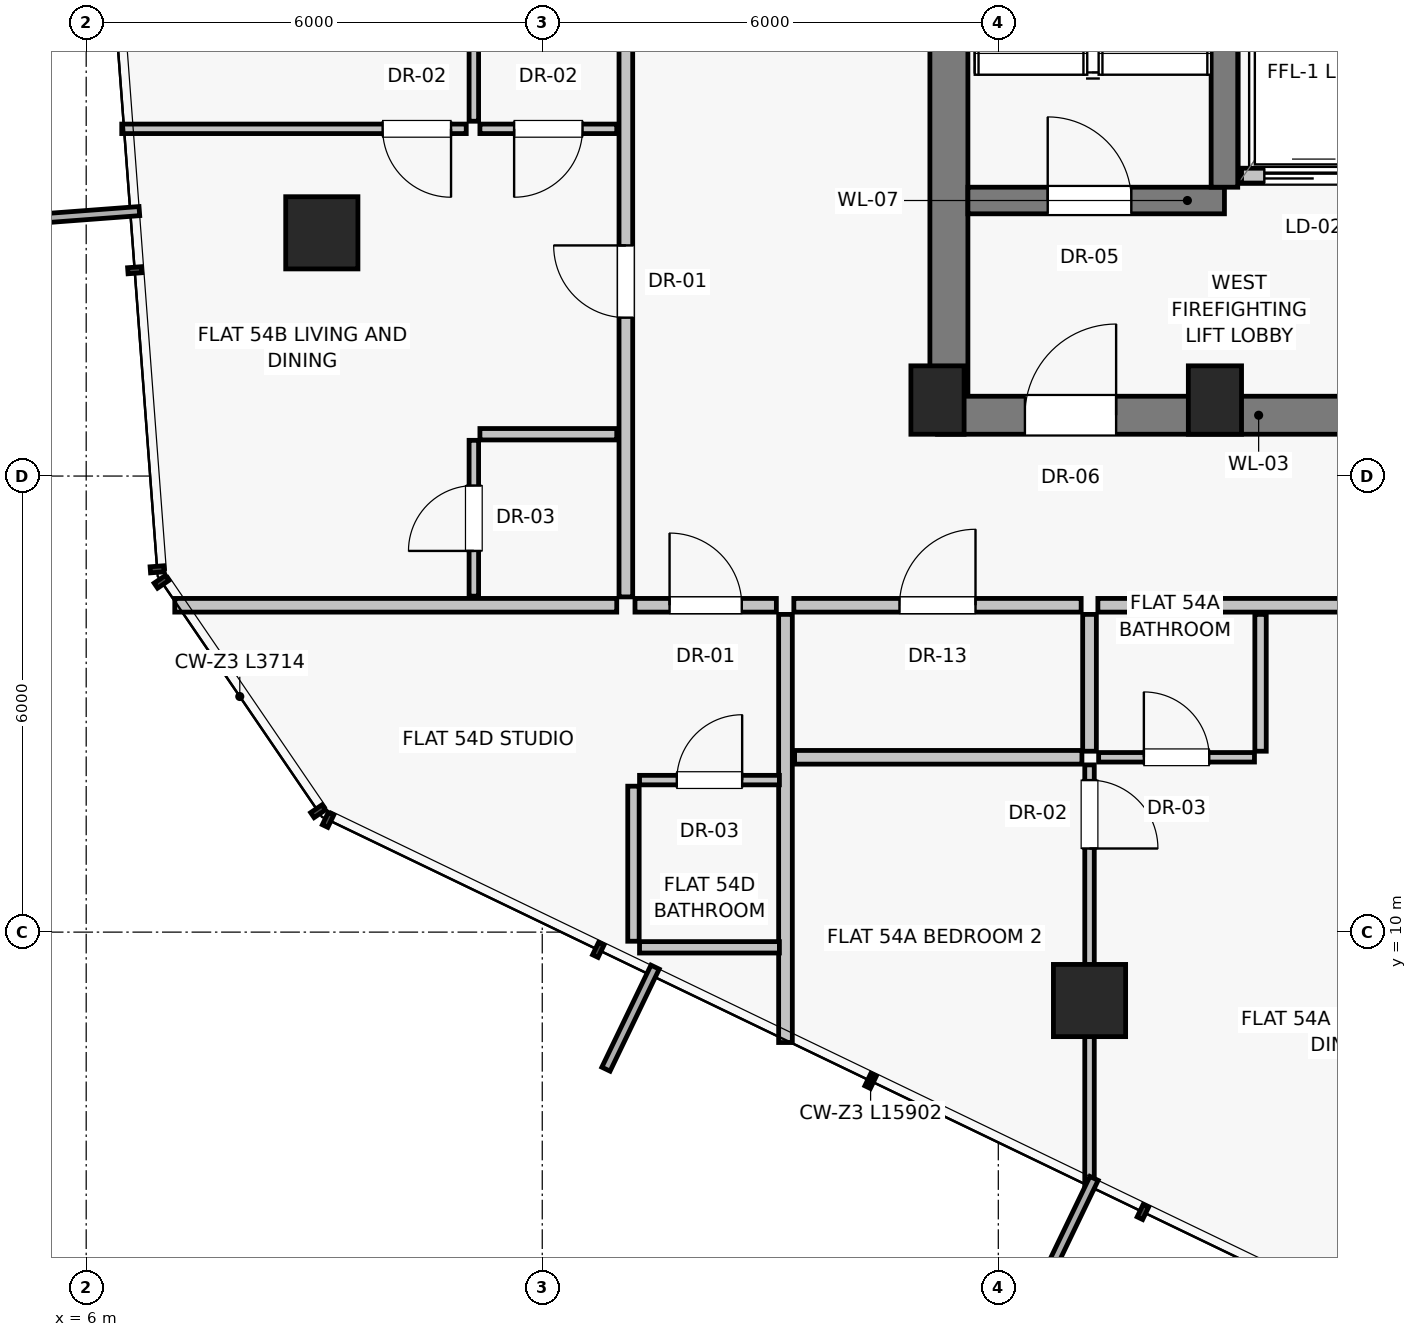
"""IFC4 building model, lengths in metres.
Left out: names, types, materials, properties, quantities, classifications, styles, units other than length and angle.
Written with IfcOpenShell. Run it as: python <this file> out.ifc"""

import sys

from ifc_helpers import new_model, si_unit, direction, frame, frame_2d, origin, origin_2d, place, context, subcontext, project, spatial, rectangle, extrude, source, transform, mapped, element, fill, save


model = new_model("IFC4")
c1 = context("Model", 3, precision=1e-05, world=origin(), true_north=direction((0.0, 1.0)))
c2 = subcontext(c1, "Body", "Model", "MODEL_VIEW")
j1 = project(units=[si_unit("LENGTHUNIT", "METRE"), si_unit("PLANEANGLEUNIT", "RADIAN")], contexts=[c1])
p1 = place(None, origin())
s1 = spatial("IfcSite", under=j1, at=p1, CompositionType="ELEMENT")
p2 = place(p1, origin())
s2 = spatial("IfcBuilding", under=s1, at=p2, CompositionType="ELEMENT")
p3 = place(p2, frame((0.0, 0.0, 191.85)))
s3 = spatial("IfcBuildingStorey", under=s2, at=p3, CompositionType="ELEMENT", Elevation=191.85)
for number, where, z_axis, x_axis in (
    (1, (17.2, 17.0, 0.0), (0.0, 0.0, 1.0), (1.0, 0.0, 0.0)),
    (2, (20.85, 17.0, 0.0), (0.0, 0.0, 1.0), (1.0, 0.0, 0.0)),
):
    element("IfcColumn", number, at=place(p3, frame(where, z_axis=z_axis, x_axis=x_axis)), inside=s3, PredefinedType="PILASTER", context=c2, shape_type="SweptSolid", body=[
        extrude(rectangle(XDim=0.7, YDim=0.9, at=origin_2d()), origin(), (0.0, 0.0, 1.0), 3.25),
    ])
for number, where, z_axis, x_axis in (
    (3, (9.1, 19.2, 0.0), (0.0, 0.0, 1.0), (1.0, 0.0, 0.0)),
    (4, (19.2, 9.1, 0.0), (0.0, 0.0, 1.0), (1.0, 0.0, 0.0)),
):
    element("IfcColumn", number, at=place(p3, frame(where, z_axis=z_axis, x_axis=x_axis)), inside=s3, PredefinedType="COLUMN", context=c2, shape_type="SweptSolid", body=[
        extrude(rectangle(XDim=0.95, YDim=0.95, at=origin_2d()), origin(), (0.0, 0.0, 1.0), 3.25),
    ])
p4 = place(p3, frame((17.35, 16.8, 0.0), z_axis=(0.0, 0.0, 1.0), x_axis=(0.0, 1.0, 0.0)))
e5 = element("IfcWall", 5, at=p4, inside=s3, PredefinedType="SHEAR", context=c2, shape_type="SweptSolid", body=[
    extrude(rectangle(XDim=14.2, YDim=0.5, at=frame_2d((7.1, 0.0))), origin(), (0.0, 0.0, 1.0), 3.015),
])
p5 = place(p3, frame((17.2, 16.8, 0.0), z_axis=(0.0, 0.0, 1.0), x_axis=(1.0, 0.0, 0.0)))
e6 = element("IfcWall", 6, at=p5, inside=s3, PredefinedType="SHEAR", context=c2, shape_type="SweptSolid", body=[
    extrude(rectangle(XDim=5.85, YDim=0.5, at=frame_2d((2.925, 0.0))), origin(), (0.0, 0.0, 1.0), 3.015),
])
p6 = place(p5, frame((1.15, 0.0, 0.0)))
e7 = element("IfcOpeningElement", 7, at=p6, cuts=e6, PredefinedType="OPENING", context=c2, shape_type="SweptSolid", body=[
    extrude(rectangle(XDim=1.2, YDim=2.03, at=frame_2d((0.6, 1.015))), frame((0.0, 0.26, 0.0), z_axis=(0.0, -1.0, 0.0), x_axis=(1.0, 0.0, 0.0)), (0.0, 0.0, 1.0), 0.52),
])
p7 = place(p3, frame((17.6, 19.625, 0.0), z_axis=(0.0, 0.0, 1.0), x_axis=(1.0, 0.0, 0.0)))
e8 = element("IfcWall", 8, at=p7, inside=s3, PredefinedType="SHEAR", context=c2, shape_type="SweptSolid", body=[
    extrude(rectangle(XDim=3.375, YDim=0.35, at=frame_2d((1.688, 0.0))), origin(), (0.0, 0.0, 1.0), 3.015),
])
p8 = place(p7, frame((1.05, 0.0, 0.0)))
e9 = element("IfcOpeningElement", 9, at=p8, cuts=e8, PredefinedType="OPENING", context=c2, shape_type="SweptSolid", body=[
    extrude(rectangle(XDim=1.1, YDim=2.03, at=frame_2d((0.55, 1.015))), frame((0.0, 0.185, 0.0), z_axis=(0.0, -1.0, 0.0), x_axis=(1.0, 0.0, 0.0)), (0.0, 0.0, 1.0), 0.37),
])
p9 = place(p3, frame((21.2, 19.95, 0.0), z_axis=(0.0, 0.0, 1.0), x_axis=(1.0, 0.0, 0.0)))
e10 = element("IfcWall", 10, at=p9, inside=s3, PredefinedType="SOLIDWALL", context=c2, shape_type="SweptSolid", body=[
    extrude(rectangle(XDim=1.85, YDim=0.2, at=frame_2d((0.925, 0.0))), origin(), (0.0, 0.0, 1.0), 3.015),
])
p10 = place(p9, frame((0.3, 0.0, 0.0)))
e11 = element("IfcOpeningElement", 11, at=p10, cuts=e10, PredefinedType="OPENING", context=c2, shape_type="SweptSolid", body=[
    extrude(rectangle(XDim=1.3, YDim=2.25, at=frame_2d((0.65, 1.125))), frame((0.0, 0.11, 0.0), z_axis=(0.0, -1.0, 0.0), x_axis=(1.0, 0.0, 0.0)), (0.0, 0.0, 1.0), 0.22),
])
p11 = place(p3, frame((20.975, 19.8, 0.0), z_axis=(0.0, 0.0, 1.0), x_axis=(0.0, 1.0, 0.0)))
e12 = element("IfcWall", 12, at=p11, inside=s3, PredefinedType="SHEAR", context=c2, shape_type="SweptSolid", body=[
    extrude(rectangle(XDim=8.775, YDim=0.35, at=frame_2d((4.387, 0.0))), origin(), (0.0, 0.0, 1.0), 3.015),
])
p12 = place(p3, frame((15.2, 14.18, 0.0), z_axis=(0.0, 0.0, 1.0), x_axis=(0.0, -1.0, 0.0)))
e13 = element("IfcWall", 13, at=p12, inside=s3, PredefinedType="PARTITIONING", context=c2, shape_type="SweptSolid", body=[
    extrude(rectangle(XDim=5.633, YDim=0.18, at=frame_2d((2.816, 0.0))), origin(), (0.0, 0.0, 1.0), 3.015),
])
p13 = place(p3, frame((15.31, 14.3, 0.0), z_axis=(0.0, 0.0, 1.0), x_axis=(1.0, 0.0, 0.0)))
e14 = element("IfcWall", 14, at=p13, inside=s3, PredefinedType="PARTITIONING", context=c2, shape_type="SweptSolid", body=[
    extrude(rectangle(XDim=3.78, YDim=0.18, at=frame_2d((1.89, 0.0))), origin(), (0.0, 0.0, 1.0), 3.015),
])
p14 = place(p13, frame((1.39, 0.0, 0.0)))
e15 = element("IfcOpeningElement", 15, at=p14, cuts=e14, PredefinedType="OPENING", context=c2, shape_type="SweptSolid", body=[
    extrude(rectangle(XDim=1.0, YDim=2.01, at=frame_2d((0.5, 1.005))), frame((0.0, 0.1, 0.0), z_axis=(0.0, -1.0, 0.0), x_axis=(1.0, 0.0, 0.0)), (0.0, 0.0, 1.0), 0.2),
])
p15 = place(p3, frame((19.31, 14.3, 0.0), z_axis=(0.0, 0.0, 1.0), x_axis=(1.0, 0.0, 0.0)))
e16 = element("IfcWall", 16, at=p15, inside=s3, PredefinedType="PARTITIONING", context=c2, shape_type="SweptSolid", body=[
    extrude(rectangle(XDim=11.78, YDim=0.18, at=frame_2d((5.89, 0.0))), origin(), (0.0, 0.0, 1.0), 3.015),
])
p16 = place(p15, frame((3.98, 0.0, 0.0)))
e17 = element("IfcOpeningElement", 17, at=p16, cuts=e16, PredefinedType="OPENING", context=c2, shape_type="SweptSolid", body=[
    extrude(rectangle(XDim=0.95, YDim=2.02, at=frame_2d((0.475, 1.01))), frame((0.0, 0.1, 0.0), z_axis=(0.0, -1.0, 0.0), x_axis=(1.0, 0.0, 0.0)), (0.0, 0.0, 1.0), 0.2),
])
p17 = place(p3, frame((15.32, 12.3, 0.0), z_axis=(0.0, 0.0, 1.0), x_axis=(1.0, 0.0, 0.0)))
e18 = element("IfcWall", 18, at=p17, inside=s3, PredefinedType="PARTITIONING", context=c2, shape_type="SweptSolid", body=[
    extrude(rectangle(XDim=3.78, YDim=0.18, at=frame_2d((1.89, 0.0))), origin(), (0.0, 0.0, 1.0), 3.015),
])
p18 = place(p3, frame((19.2, 14.18, 0.0), z_axis=(0.0, 0.0, 1.0), x_axis=(0.0, -1.0, 0.0)))
e19 = element("IfcWall", 19, at=p18, inside=s3, PredefinedType="PARTITIONING", context=c2, shape_type="SweptSolid", body=[
    extrude(rectangle(XDim=1.8, YDim=0.18, at=frame_2d((0.9, 0.0))), origin(), (0.0, 0.0, 1.0), 3.015),
])
p19 = place(p3, frame((19.2, 12.2, 0.0), z_axis=(0.0, 0.0, 1.0), x_axis=(0.0, -1.0, 0.0)))
e20 = element("IfcWall", 20, at=p19, inside=s3, PredefinedType="PARTITIONING", context=c2, shape_type="SweptSolid", body=[
    extrude(rectangle(XDim=5.578, YDim=0.125, at=frame_2d((2.789, 0.0))), origin(), (0.0, 0.0, 1.0), 2.469),
])
p20 = place(p19, frame((0.2, 0.0, 0.0)))
e21 = element("IfcOpeningElement", 21, at=p20, cuts=e20, PredefinedType="OPENING", context=c2, shape_type="SweptSolid", body=[
    extrude(rectangle(XDim=0.9, YDim=2.01, at=frame_2d((0.45, 1.005))), frame((0.0, 0.073, 0.0), z_axis=(0.0, -1.0, 0.0), x_axis=(1.0, 0.0, 0.0)), (0.0, 0.0, 1.0), 0.145),
])
p21 = place(p3, frame((21.45, 14.18, 0.0), z_axis=(0.0, 0.0, 1.0), x_axis=(0.0, -1.0, 0.0)))
e22 = element("IfcWall", 22, at=p21, inside=s3, PredefinedType="PARTITIONING", context=c2, shape_type="SweptSolid", body=[
    extrude(rectangle(XDim=1.8, YDim=0.15, at=frame_2d((0.9, 0.0))), origin(), (0.0, 0.0, 1.0), 3.015),
])
p22 = place(p3, frame((19.32, 12.3, 0.0), z_axis=(0.0, 0.0, 1.0), x_axis=(1.0, 0.0, 0.0)))
e23 = element("IfcWall", 23, at=p22, inside=s3, PredefinedType="PARTITIONING", context=c2, shape_type="SweptSolid", body=[
    extrude(rectangle(XDim=2.05, YDim=0.125, at=frame_2d((1.025, 0.0))), origin(), (0.0, 0.0, 1.0), 3.015),
])
p23 = place(p22, frame((0.595, 0.0, 0.0)))
e24 = element("IfcOpeningElement", 24, at=p23, cuts=e23, PredefinedType="OPENING", context=c2, shape_type="SweptSolid", body=[
    extrude(rectangle(XDim=0.86, YDim=2.01, at=frame_2d((0.43, 1.005))), frame((0.0, 0.073, 0.0), z_axis=(0.0, -1.0, 0.0), x_axis=(1.0, 0.0, 0.0)), (0.0, 0.0, 1.0), 0.145),
])
p24 = place(p3, frame((12.98, 14.3, 0.0), z_axis=(0.0, 0.0, 1.0), x_axis=(-1.0, 0.0, 0.0)))
e25 = element("IfcWall", 25, at=p24, inside=s3, PredefinedType="PARTITIONING", context=c2, shape_type="SweptSolid", body=[
    extrude(rectangle(XDim=5.814, YDim=0.18, at=frame_2d((2.907, 0.0))), origin(), (0.0, 0.0, 1.0), 3.015),
])
p25 = place(p3, frame((13.1, 14.41, 0.0), z_axis=(0.0, 0.0, 1.0), x_axis=(0.0, 1.0, 0.0)))
e26 = element("IfcWall", 26, at=p25, inside=s3, PredefinedType="PARTITIONING", context=c2, shape_type="SweptSolid", body=[
    extrude(rectangle(XDim=11.176, YDim=0.18, at=frame_2d((5.588, 0.0))), origin(), (0.0, 0.0, 1.0), 2.662),
])
p26 = place(p25, frame((3.674, 0.0, 0.0)))
e27 = element("IfcOpeningElement", 27, at=p26, cuts=e26, PredefinedType="OPENING", context=c2, shape_type="SweptSolid", body=[
    extrude(rectangle(XDim=0.95, YDim=2.02, at=frame_2d((0.475, 1.01))), frame((0.0, 0.1, 0.0), z_axis=(0.0, -1.0, 0.0), x_axis=(1.0, 0.0, 0.0)), (0.0, 0.0, 1.0), 0.2),
])
p27 = place(p3, frame((12.98, 16.55, 0.0), z_axis=(0.0, 0.0, 1.0), x_axis=(-1.0, 0.0, 0.0)))
e28 = element("IfcWall", 28, at=p27, inside=s3, PredefinedType="PARTITIONING", context=c2, shape_type="SweptSolid", body=[
    extrude(rectangle(XDim=1.8, YDim=0.15, at=frame_2d((0.9, 0.0))), origin(), (0.0, 0.0, 1.0), 3.015),
])
p28 = place(p3, frame((11.1, 14.42, 0.0), z_axis=(0.0, 0.0, 1.0), x_axis=(0.0, 1.0, 0.0)))
e29 = element("IfcWall", 29, at=p28, inside=s3, PredefinedType="PARTITIONING", context=c2, shape_type="SweptSolid", body=[
    extrude(rectangle(XDim=2.05, YDim=0.125, at=frame_2d((1.025, 0.0))), origin(), (0.0, 0.0, 1.0), 3.015),
])
p29 = place(p28, frame((0.595, 0.0, 0.0)))
e30 = element("IfcOpeningElement", 30, at=p29, cuts=e29, PredefinedType="OPENING", context=c2, shape_type="SweptSolid", body=[
    extrude(rectangle(XDim=0.86, YDim=2.01, at=frame_2d((0.43, 1.005))), frame((0.0, 0.073, 0.0), z_axis=(0.0, -1.0, 0.0), x_axis=(1.0, 0.0, 0.0)), (0.0, 0.0, 1.0), 0.145),
])
p30 = place(p3, frame((12.98, 20.568, 0.0), z_axis=(0.0, 0.0, 1.0), x_axis=(-1.0, 0.0, 0.0)))
e31 = element("IfcWall", 31, at=p30, inside=s3, PredefinedType="PARTITIONING", context=c2, shape_type="SweptSolid", body=[
    extrude(rectangle(XDim=1.8, YDim=0.125, at=frame_2d((0.9, 0.0))), origin(), (0.0, 0.0, 1.0), 3.015),
])
p31 = place(p30, frame((0.45, 0.0, 0.0)))
e32 = element("IfcOpeningElement", 32, at=p31, cuts=e31, PredefinedType="OPENING", context=c2, shape_type="SweptSolid", body=[
    extrude(rectangle(XDim=0.9, YDim=2.01, at=frame_2d((0.45, 1.005))), frame((0.0, 0.073, 0.0), z_axis=(0.0, -1.0, 0.0), x_axis=(1.0, 0.0, 0.0)), (0.0, 0.0, 1.0), 0.145),
])
p32 = place(p3, frame((11.1, 20.668, 0.0), z_axis=(0.0, 0.0, 1.0), x_axis=(0.0, 1.0, 0.0)))
e33 = element("IfcWall", 33, at=p32, inside=s3, PredefinedType="PARTITIONING", context=c2, shape_type="SweptSolid", body=[
    extrude(rectangle(XDim=4.908, YDim=0.125, at=frame_2d((2.454, 0.0))), origin(), (0.0, 0.0, 1.0), 3.015),
])
p33 = place(p3, frame((11.0, 20.568, 0.0), z_axis=(0.0, 0.0, 1.0), x_axis=(-1.0, 0.0, 0.0)))
e34 = element("IfcWall", 34, at=p33, inside=s3, PredefinedType="PARTITIONING", context=c2, shape_type="SweptSolid", body=[
    extrude(rectangle(XDim=4.532, YDim=0.125, at=frame_2d((2.266, 0.0))), origin(), (0.0, 0.0, 1.0), 3.015),
])
p34 = place(p33, frame((0.2, 0.0, 0.0)))
e35 = element("IfcOpeningElement", 35, at=p34, cuts=e34, PredefinedType="OPENING", context=c2, shape_type="SweptSolid", body=[
    extrude(rectangle(XDim=0.9, YDim=2.01, at=frame_2d((0.45, 1.005))), frame((0.0, 0.073, 0.0), z_axis=(0.0, -1.0, 0.0), x_axis=(1.0, 0.0, 0.0)), (0.0, 0.0, 1.0), 0.145),
])
p35 = place(p3, frame((13.22, 14.3, 0.0), z_axis=(0.0, 0.0, 1.0), x_axis=(1.0, 0.0, 0.0)))
e36 = element("IfcWall", 36, at=p35, inside=s3, PredefinedType="PARTITIONING", context=c2, shape_type="SweptSolid", body=[
    extrude(rectangle(XDim=1.86, YDim=0.18, at=frame_2d((0.93, 0.0))), origin(), (0.0, 0.0, 1.0), 3.015),
])
p36 = place(p35, frame((0.455, 0.0, 0.0)))
e37 = element("IfcOpeningElement", 37, at=p36, cuts=e36, PredefinedType="OPENING", context=c2, shape_type="SweptSolid", body=[
    extrude(rectangle(XDim=0.95, YDim=2.02, at=frame_2d((0.475, 1.01))), frame((0.0, 0.1, 0.0), z_axis=(0.0, -1.0, 0.0), x_axis=(1.0, 0.0, 0.0)), (0.0, 0.0, 1.0), 0.2),
])
p37 = place(p3, frame((13.28, 12.0, 0.0), z_axis=(0.0, 0.0, 1.0), x_axis=(1.0, 0.0, 0.0)))
e38 = element("IfcWall", 38, at=p37, inside=s3, PredefinedType="PARTITIONING", context=c2, shape_type="SweptSolid", body=[
    extrude(rectangle(XDim=1.84, YDim=0.125, at=frame_2d((0.92, 0.0))), origin(), (0.0, 0.0, 1.0), 3.015),
])
p38 = place(p37, frame((0.49, 0.0, 0.0)))
e39 = element("IfcOpeningElement", 39, at=p38, cuts=e38, PredefinedType="OPENING", context=c2, shape_type="SweptSolid", body=[
    extrude(rectangle(XDim=0.86, YDim=2.01, at=frame_2d((0.43, 1.005))), frame((0.0, 0.073, 0.0), z_axis=(0.0, -1.0, 0.0), x_axis=(1.0, 0.0, 0.0)), (0.0, 0.0, 1.0), 0.145),
])
p39 = place(p3, frame((13.28, 9.8, 0.0), z_axis=(0.0, 0.0, 1.0), x_axis=(1.0, 0.0, 0.0)))
e40 = element("IfcWall", 40, at=p39, inside=s3, PredefinedType="PARTITIONING", context=c2, shape_type="SweptSolid", body=[
    extrude(rectangle(XDim=1.84, YDim=0.15, at=frame_2d((0.92, 0.0))), origin(), (0.0, 0.0, 1.0), 3.015),
])
p40 = place(p3, frame((13.2, 9.88, 0.0), z_axis=(0.0, 0.0, 1.0), x_axis=(0.0, 1.0, 0.0)))
e41 = element("IfcWall", 41, at=p40, inside=s3, PredefinedType="PARTITIONING", context=c2, shape_type="SweptSolid", body=[
    extrude(rectangle(XDim=2.04, YDim=0.15, at=frame_2d((1.02, 0.0))), origin(), (0.0, 0.0, 1.0), 3.015),
])
m1 = source(origin(), c2, "Body", "SweptSolid", [
    extrude(rectangle(XDim=1.2, YDim=2.03, at=frame_2d((0.6, 1.015))), frame((0.0, 0.025, 0.0), z_axis=(0.0, -1.0, 0.0), x_axis=(1.0, 0.0, 0.0)), (0.0, 0.0, 1.0), 0.05),
])
p41 = place(p6, origin())
e42 = element("IfcDoor", 42, at=p41, inside=s3, OperationType="SINGLE_SWING_RIGHT", PredefinedType="DOOR", context=c2, shape_type="MappedRepresentation", body=[
    mapped(m1, transform((0.0, 0.0, 0.0), scale=1.0)),
])
fill(e7, e42)
m2 = source(origin(), c2, "Body", "SweptSolid", [
    extrude(rectangle(XDim=1.1, YDim=2.03, at=frame_2d((0.55, 1.015))), frame((0.0, 0.025, 0.0), z_axis=(0.0, -1.0, 0.0), x_axis=(1.0, 0.0, 0.0)), (0.0, 0.0, 1.0), 0.05),
])
p42 = place(p8, origin())
e43 = element("IfcDoor", 43, at=p42, inside=s3, OperationType="SINGLE_SWING_LEFT", PredefinedType="DOOR", context=c2, shape_type="MappedRepresentation", body=[
    mapped(m2, transform((0.0, 0.0, 0.0), scale=1.0)),
])
fill(e9, e43)
m3 = source(origin(), c2, "Body", "SweptSolid", [
    extrude(rectangle(XDim=1.3, YDim=2.25, at=frame_2d((0.65, 1.125))), frame((0.0, 0.025, 0.0), z_axis=(0.0, -1.0, 0.0), x_axis=(1.0, 0.0, 0.0)), (0.0, 0.0, 1.0), 0.05),
])
p43 = place(p10, origin())
e44 = element("IfcDoor", 44, at=p43, inside=s3, OperationType="SLIDING_TO_LEFT", PredefinedType="DOOR", context=c2, shape_type="MappedRepresentation", body=[
    mapped(m3, transform((0.0, 0.0, 0.0), scale=1.0)),
])
fill(e11, e44)
m4 = source(origin(), c2, "Body", "SweptSolid", [
    extrude(rectangle(XDim=1.0, YDim=2.01, at=frame_2d((0.5, 1.005))), frame((0.0, 0.025, 0.0), z_axis=(0.0, -1.0, 0.0), x_axis=(1.0, 0.0, 0.0)), (0.0, 0.0, 1.0), 0.05),
])
p44 = place(p14, origin())
e45 = element("IfcDoor", 45, at=p44, inside=s3, OperationType="SINGLE_SWING_RIGHT", PredefinedType="DOOR", context=c2, shape_type="MappedRepresentation", body=[
    mapped(m4, transform((0.0, 0.0, 0.0), scale=1.0)),
])
fill(e15, e45)
m5 = source(origin(), c2, "Body", "SweptSolid", [
    extrude(rectangle(XDim=0.9, YDim=2.01, at=frame_2d((0.45, 1.005))), frame((0.0, 0.025, 0.0), z_axis=(0.0, -1.0, 0.0), x_axis=(1.0, 0.0, 0.0)), (0.0, 0.0, 1.0), 0.05),
])
p45 = place(p20, origin())
e46 = element("IfcDoor", 46, at=p45, inside=s3, OperationType="SINGLE_SWING_RIGHT", PredefinedType="DOOR", context=c2, shape_type="MappedRepresentation", body=[
    mapped(m5, transform((0.0, 0.0, 0.0), scale=1.0)),
])
fill(e21, e46)
m6 = source(origin(), c2, "Body", "SweptSolid", [
    extrude(rectangle(XDim=0.86, YDim=2.01, at=frame_2d((0.43, 1.005))), frame((0.0, 0.025, 0.0), z_axis=(0.0, -1.0, 0.0), x_axis=(1.0, 0.0, 0.0)), (0.0, 0.0, 1.0), 0.05),
])
p46 = place(p23, origin())
e47 = element("IfcDoor", 47, at=p46, inside=s3, OperationType="SINGLE_SWING_LEFT", PredefinedType="DOOR", context=c2, shape_type="MappedRepresentation", body=[
    mapped(m6, transform((0.0, 0.0, 0.0), scale=1.0)),
])
fill(e24, e47)
m7 = source(origin(), c2, "Body", "SweptSolid", [
    extrude(rectangle(XDim=0.95, YDim=2.02, at=frame_2d((0.475, 1.01))), frame((0.0, 0.025, 0.0), z_axis=(0.0, -1.0, 0.0), x_axis=(1.0, 0.0, 0.0)), (0.0, 0.0, 1.0), 0.05),
])
p47 = place(p26, origin())
e48 = element("IfcDoor", 48, at=p47, inside=s3, OperationType="SINGLE_SWING_RIGHT", PredefinedType="DOOR", context=c2, shape_type="MappedRepresentation", body=[
    mapped(m7, transform((0.0, 0.0, 0.0), scale=1.0)),
])
fill(e27, e48)
p48 = place(p29, origin())
e49 = element("IfcDoor", 49, at=p48, inside=s3, OperationType="SINGLE_SWING_LEFT", PredefinedType="DOOR", context=c2, shape_type="MappedRepresentation", body=[
    mapped(m6, transform((0.0, 0.0, 0.0), scale=1.0)),
])
fill(e30, e49)
p49 = place(p31, origin())
e50 = element("IfcDoor", 50, at=p49, inside=s3, OperationType="SINGLE_SWING_RIGHT", PredefinedType="DOOR", context=c2, shape_type="MappedRepresentation", body=[
    mapped(m5, transform((0.0, 0.0, 0.0), scale=1.0)),
])
fill(e32, e50)
p50 = place(p34, origin())
e51 = element("IfcDoor", 51, at=p50, inside=s3, OperationType="SINGLE_SWING_LEFT", PredefinedType="DOOR", context=c2, shape_type="MappedRepresentation", body=[
    mapped(m5, transform((0.0, 0.0, 0.0), scale=1.0)),
])
fill(e35, e51)
p51 = place(p36, origin())
e52 = element("IfcDoor", 52, at=p51, inside=s3, OperationType="SINGLE_SWING_LEFT", PredefinedType="DOOR", context=c2, shape_type="MappedRepresentation", body=[
    mapped(m7, transform((0.0, 0.0, 0.0), scale=1.0)),
])
fill(e37, e52)
p52 = place(p38, origin())
e53 = element("IfcDoor", 53, at=p52, inside=s3, OperationType="SINGLE_SWING_RIGHT", PredefinedType="DOOR", context=c2, shape_type="MappedRepresentation", body=[
    mapped(m6, transform((0.0, 0.0, 0.0), scale=1.0)),
])
fill(e39, e53)
save(model, sys.argv[1])
